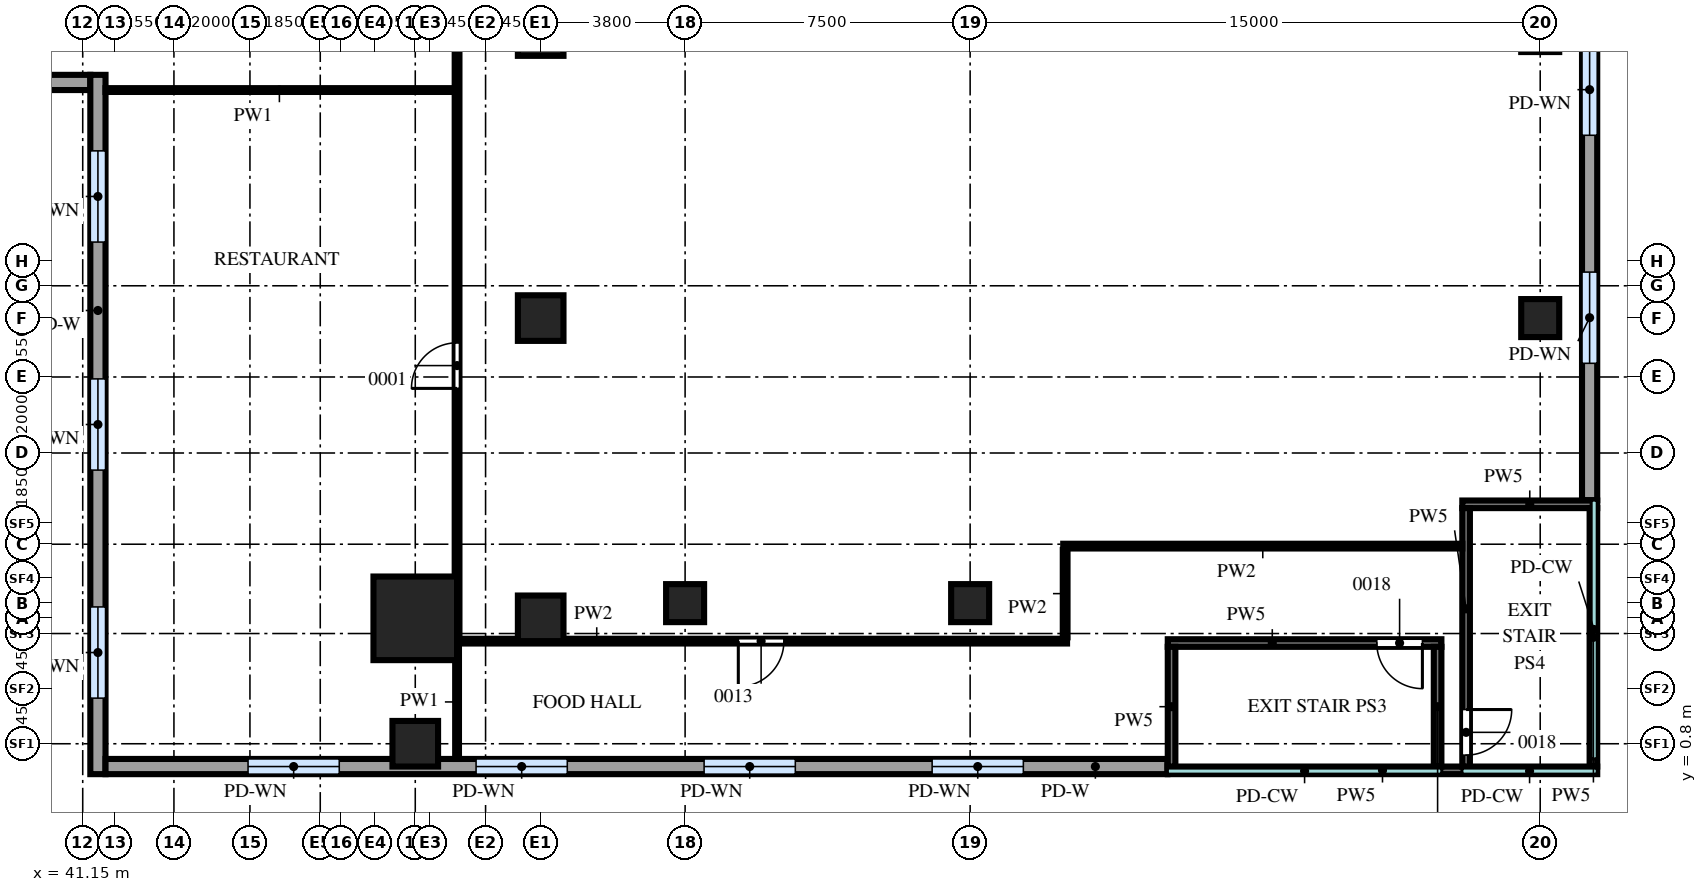
"""IFC4 building model, lengths in metres.
Left out: names, types, materials, properties, quantities, classifications, styles, units other than length and angle.
Written with IfcOpenShell. Run it as: python <this file> out.ifc"""

import sys

from ifc_helpers import new_model, si_unit, direction, frame, frame_2d, origin, origin_2d, place, context, subcontext, project, spatial, rectangle, extrude, source, transform, mapped, element, fill, save


model = new_model("IFC4")
c1 = context("Model", 3, precision=1e-05, world=origin(), true_north=direction((0.0, 1.0)))
c2 = subcontext(c1, "Body", "Model", "MODEL_VIEW")
j1 = project(units=[si_unit("LENGTHUNIT", "METRE"), si_unit("PLANEANGLEUNIT", "RADIAN")], contexts=[c1])
p1 = place(None, origin())
s1 = spatial("IfcSite", under=j1, at=p1, CompositionType="ELEMENT")
p2 = place(p1, origin())
s2 = spatial("IfcBuilding", under=s1, at=p2, CompositionType="ELEMENT")
p3 = place(p2, frame((0.0, 0.0, 18.5)))
s3 = spatial("IfcBuildingStorey", under=s2, at=p3, CompositionType="ELEMENT", Elevation=18.5)
m1 = source(origin(), c2, "Body", "SweptSolid", [
    extrude(rectangle(XDim=2.2, YDim=2.2, at=origin_2d()), origin(), (0.0, 0.0, 1.0), 4.7),
])
p4 = place(p3, frame((49.9, 4.1, 0.0), z_axis=(0.0, 0.0, 1.0), x_axis=(1.0, 0.0, 0.0)))
e1 = element("IfcColumn", 1, at=p4, inside=s3, PredefinedType="COLUMN", context=c2, shape_type="MappedRepresentation", body=[
    mapped(m1, transform((0.0, 0.0, 0.0))),
])
m2 = source(origin(), c2, "Body", "SweptSolid", [
    extrude(rectangle(XDim=1.2, YDim=1.2, at=origin_2d()), origin(), (0.0, 0.0, 1.0), 4.7),
])
for number, where, z_axis, x_axis in (
    (2, (49.9, 0.8, 0.0), (0.0, 0.0, 1.0), (1.0, 0.0, 0.0)),
    (3, (53.2, 4.1, 0.0), (0.0, 0.0, 1.0), (1.0, 0.0, 0.0)),
    (4, (53.2, 12.0, 0.0), (0.0, 0.0, 1.0), (1.0, 0.0, 0.0)),
    (5, (53.2, 19.5, 0.0), (0.0, 0.0, 1.0), (1.0, 0.0, 0.0)),
):
    element("IfcColumn", number, at=place(p3, frame(where, z_axis=z_axis, x_axis=x_axis)), inside=s3, PredefinedType="COLUMN", context=c2, shape_type="MappedRepresentation", body=[
        mapped(m2, transform((0.0, 0.0, 0.0))),
    ])
m3 = source(origin(), c2, "Body", "SweptSolid", [
    extrude(rectangle(XDim=1.0, YDim=1.0, at=origin_2d()), origin(), (0.0, 0.0, 1.0), 4.7),
])
for number, where, z_axis, x_axis in (
    (6, (57.0, 4.5, 0.0), (0.0, 0.0, 1.0), (1.0, 0.0, 0.0)),
    (7, (64.5, 4.5, 0.0), (0.0, 0.0, 1.0), (1.0, 0.0, 0.0)),
    (8, (79.5, 12.0, 0.0), (0.0, 0.0, 1.0), (1.0, 0.0, 0.0)),
):
    element("IfcColumn", number, at=place(p3, frame(where, z_axis=z_axis, x_axis=x_axis)), inside=s3, PredefinedType="COLUMN", context=c2, shape_type="MappedRepresentation", body=[
        mapped(m3, transform((0.0, 0.0, 0.0))),
    ])
m4 = source(origin(), c2, "Body", "SweptSolid", [
    extrude(rectangle(XDim=11.1, YDim=0.4, at=frame_2d((5.55, 0.0))), origin(), (0.0, 0.0, 1.0), 4.7),
])
p5 = place(p3, frame((30.25, 18.2, 0.0), z_axis=(0.0, 0.0, 1.0), x_axis=(1.0, 0.0, 0.0)))
e9 = element("IfcWall", 9, at=p5, inside=s3, PredefinedType="SOLIDWALL", context=c2, shape_type="MappedRepresentation", body=[
    mapped(m4, transform((0.0, 0.0, 0.0))),
])
m5 = source(origin(), c2, "Body", "SweptSolid", [
    extrude(rectangle(XDim=2.4, YDim=2.4, at=frame_2d((1.2, 1.2))), frame((0.0, 0.21, 0.0), z_axis=(0.0, -1.0, 0.0), x_axis=(1.0, 0.0, 0.0)), (0.0, 0.0, 1.0), 0.42),
])
p6 = place(p5, frame((4.35, 0.0, 1.0)))
e10 = element("IfcOpeningElement", 10, at=p6, cuts=e9, PredefinedType="OPENING", context=c2, shape_type="MappedRepresentation", body=[
    mapped(m5, transform((0.0, 0.0, 0.0))),
])
m6 = source(origin(), c2, "Body", "SweptSolid", [
    extrude(rectangle(XDim=18.4, YDim=0.4, at=frame_2d((9.2, 0.0))), origin(), (0.0, 0.0, 1.0), 4.7),
])
p7 = place(p3, frame((41.55, 18.4, 0.0), z_axis=(0.0, 0.0, 1.0), x_axis=(0.0, -1.0, 0.0)))
e11 = element("IfcWall", 11, at=p7, inside=s3, PredefinedType="SOLIDWALL", context=c2, shape_type="MappedRepresentation", body=[
    mapped(m6, transform((0.0, 0.0, 0.0))),
])
p8 = place(p7, frame((2.0, 0.0, 1.0)))
e12 = element("IfcOpeningElement", 12, at=p8, cuts=e11, PredefinedType="OPENING", context=c2, shape_type="MappedRepresentation", body=[
    mapped(m5, transform((0.0, 0.0, 0.0))),
])
p9 = place(p7, frame((8.0, 0.0, 1.0)))
e13 = element("IfcOpeningElement", 13, at=p9, cuts=e11, PredefinedType="OPENING", context=c2, shape_type="MappedRepresentation", body=[
    mapped(m5, transform((0.0, 0.0, 0.0))),
])
p10 = place(p7, frame((14.0, 0.0, 1.0)))
e14 = element("IfcOpeningElement", 14, at=p10, cuts=e11, PredefinedType="OPENING", context=c2, shape_type="MappedRepresentation", body=[
    mapped(m5, transform((0.0, 0.0, 0.0))),
])
m7 = source(origin(), c2, "Body", "SweptSolid", [
    extrude(rectangle(XDim=27.94, YDim=0.4, at=frame_2d((13.97, 0.0))), origin(), (0.0, 0.0, 1.0), 4.7),
])
p11 = place(p3, frame((41.75, 0.2, 0.0), z_axis=(0.0, 0.0, 1.0), x_axis=(1.0, 0.0, 0.0)))
e15 = element("IfcWall", 15, at=p11, inside=s3, PredefinedType="SOLIDWALL", context=c2, shape_type="MappedRepresentation", body=[
    mapped(m7, transform((0.0, 0.0, 0.0))),
])
p12 = place(p11, frame((3.75, 0.0, 1.0)))
e16 = element("IfcOpeningElement", 16, at=p12, cuts=e15, PredefinedType="OPENING", context=c2, shape_type="MappedRepresentation", body=[
    mapped(m5, transform((0.0, 0.0, 0.0))),
])
p13 = place(p11, frame((9.75, 0.0, 1.0)))
e17 = element("IfcOpeningElement", 17, at=p13, cuts=e15, PredefinedType="OPENING", context=c2, shape_type="MappedRepresentation", body=[
    mapped(m5, transform((0.0, 0.0, 0.0))),
])
p14 = place(p11, frame((15.75, 0.0, 1.0)))
e18 = element("IfcOpeningElement", 18, at=p14, cuts=e15, PredefinedType="OPENING", context=c2, shape_type="MappedRepresentation", body=[
    mapped(m5, transform((0.0, 0.0, 0.0))),
])
p15 = place(p11, frame((21.75, 0.0, 1.0)))
e19 = element("IfcOpeningElement", 19, at=p15, cuts=e15, PredefinedType="OPENING", context=c2, shape_type="MappedRepresentation", body=[
    mapped(m5, transform((0.0, 0.0, 0.0))),
])
m8 = source(origin(), c2, "Body", "SweptSolid", [
    extrude(rectangle(XDim=39.58, YDim=0.4, at=frame_2d((19.79, 0.0))), origin(), (0.0, 0.0, 1.0), 4.7),
])
p16 = place(p3, frame((80.8, 7.21, 0.0), z_axis=(0.0, 0.0, 1.0), x_axis=(0.0, 1.0, 0.0)))
e20 = element("IfcWall", 20, at=p16, inside=s3, PredefinedType="SOLIDWALL", context=c2, shape_type="MappedRepresentation", body=[
    mapped(m8, transform((0.0, 0.0, 0.0))),
])
p17 = place(p16, frame((3.6, 0.0, 1.0)))
e21 = element("IfcOpeningElement", 21, at=p17, cuts=e20, PredefinedType="OPENING", context=c2, shape_type="MappedRepresentation", body=[
    mapped(m5, transform((0.0, 0.0, 0.0))),
])
p18 = place(p16, frame((9.6, 0.0, 1.0)))
e22 = element("IfcOpeningElement", 22, at=p18, cuts=e20, PredefinedType="OPENING", context=c2, shape_type="MappedRepresentation", body=[
    mapped(m5, transform((0.0, 0.0, 0.0))),
])
p19 = place(p16, frame((15.6, 0.0, 1.0)))
e23 = element("IfcOpeningElement", 23, at=p19, cuts=e20, PredefinedType="OPENING", context=c2, shape_type="MappedRepresentation", body=[
    mapped(m5, transform((0.0, 0.0, 0.0))),
])
p20 = place(p16, frame((21.6, 0.0, 1.0)))
e24 = element("IfcOpeningElement", 24, at=p20, cuts=e20, PredefinedType="OPENING", context=c2, shape_type="MappedRepresentation", body=[
    mapped(m5, transform((0.0, 0.0, 0.0))),
])
p21 = place(p16, frame((27.6, 0.0, 1.0)))
e25 = element("IfcOpeningElement", 25, at=p21, cuts=e20, PredefinedType="OPENING", context=c2, shape_type="MappedRepresentation", body=[
    mapped(m5, transform((0.0, 0.0, 0.0))),
])
p22 = place(p16, frame((33.6, 0.0, 1.0)))
e26 = element("IfcOpeningElement", 26, at=p22, cuts=e20, PredefinedType="OPENING", context=c2, shape_type="MappedRepresentation", body=[
    mapped(m5, transform((0.0, 0.0, 0.0))),
])
m9 = source(origin(), c2, "Body", "SweptSolid", [
    extrude(rectangle(XDim=11.3, YDim=0.2, at=frame_2d((5.65, 0.0))), origin(), (0.0, 0.0, 1.0), 4.7),
])
p23 = place(p3, frame((69.7, 0.1, 0.0), z_axis=(0.0, 0.0, 1.0), x_axis=(1.0, 0.0, 0.0)))
e27 = element("IfcWall", 27, at=p23, inside=s3, PredefinedType="PARTITIONING", context=c2, shape_type="MappedRepresentation", body=[
    mapped(m9, transform((0.0, 0.0, 0.0))),
])
m10 = source(origin(), c2, "Body", "SweptSolid", [
    extrude(rectangle(XDim=7.2, YDim=0.2, at=frame_2d((3.6, 0.0))), origin(), (0.0, 0.0, 1.0), 4.7),
])
p24 = place(p3, frame((69.7, 3.45, 0.0), z_axis=(0.0, 0.0, 1.0), x_axis=(1.0, 0.0, 0.0)))
e28 = element("IfcWall", 28, at=p24, inside=s3, PredefinedType="PARTITIONING", context=c2, shape_type="MappedRepresentation", body=[
    mapped(m10, transform((0.0, 0.0, 0.0))),
])
m11 = source(origin(), c2, "Body", "SweptSolid", [
    extrude(rectangle(XDim=1.2, YDim=2.1, at=frame_2d((0.6, 1.05))), frame((0.0, 0.11, 0.0), z_axis=(0.0, -1.0, 0.0), x_axis=(1.0, 0.0, 0.0)), (0.0, 0.0, 1.0), 0.22),
])
p25 = place(p24, frame((5.5, 0.0, 0.0)))
e29 = element("IfcOpeningElement", 29, at=p25, cuts=e28, PredefinedType="OPENING", context=c2, shape_type="MappedRepresentation", body=[
    mapped(m11, transform((0.0, 0.0, 0.0))),
])
m12 = source(origin(), c2, "Body", "SweptSolid", [
    extrude(rectangle(XDim=3.15, YDim=0.2, at=frame_2d((1.575, 0.0))), origin(), (0.0, 0.0, 1.0), 4.7),
])
for number, where, z_axis, x_axis in (
    (30, (69.8, 0.2, 0.0), (0.0, 0.0, 1.0), (0.0, 1.0, 0.0)),
    (31, (76.8, 0.2, 0.0), (0.0, 0.0, 1.0), (0.0, 1.0, 0.0)),
):
    element("IfcWall", number, at=place(p3, frame(where, z_axis=z_axis, x_axis=x_axis)), inside=s3, PredefinedType="PARTITIONING", context=c2, shape_type="MappedRepresentation", body=[
        mapped(m12, transform((0.0, 0.0, 0.0))),
    ])
m13 = source(origin(), c2, "Body", "SweptSolid", [
    extrude(rectangle(XDim=3.55, YDim=0.2, at=frame_2d((1.775, 0.0))), origin(), (0.0, 0.0, 1.0), 4.7),
])
p26 = place(p3, frame((77.45, 7.1, 0.0), z_axis=(0.0, 0.0, 1.0), x_axis=(1.0, 0.0, 0.0)))
e32 = element("IfcWall", 32, at=p26, inside=s3, PredefinedType="PARTITIONING", context=c2, shape_type="MappedRepresentation", body=[
    mapped(m13, transform((0.0, 0.0, 0.0))),
])
m14 = source(origin(), c2, "Body", "SweptSolid", [
    extrude(rectangle(XDim=6.8, YDim=0.2, at=frame_2d((3.4, 0.0))), origin(), (0.0, 0.0, 1.0), 4.7),
])
p27 = place(p3, frame((77.55, 0.2, 0.0), z_axis=(0.0, 0.0, 1.0), x_axis=(0.0, 1.0, 0.0)))
e33 = element("IfcWall", 33, at=p27, inside=s3, PredefinedType="PARTITIONING", context=c2, shape_type="MappedRepresentation", body=[
    mapped(m14, transform((0.0, 0.0, 0.0))),
])
p28 = place(p27, frame((0.3, 0.0, 0.0)))
e34 = element("IfcOpeningElement", 34, at=p28, cuts=e33, PredefinedType="OPENING", context=c2, shape_type="MappedRepresentation", body=[
    mapped(m11, transform((0.0, 0.0, 0.0))),
])
p29 = place(p3, frame((80.9, 0.2, 0.0), z_axis=(0.0, 0.0, 1.0), x_axis=(0.0, 1.0, 0.0)))
e35 = element("IfcWall", 35, at=p29, inside=s3, PredefinedType="PARTITIONING", context=c2, shape_type="MappedRepresentation", body=[
    mapped(m14, transform((0.0, 0.0, 0.0))),
])
m15 = source(origin(), c2, "Body", "SweptSolid", [
    extrude(rectangle(XDim=3.0, YDim=0.1, at=frame_2d((1.5, 0.0))), origin(), (0.0, 0.0, 1.0), 4.7),
])
p30 = place(p3, frame((51.0, 0.4, 0.0), z_axis=(0.0, 0.0, 1.0), x_axis=(0.0, 1.0, 0.0)))
e36 = element("IfcWall", 36, at=p30, inside=s3, PredefinedType="PARTITIONING", context=c2, shape_type="MappedRepresentation", body=[
    mapped(m15, transform((0.0, 0.0, 0.0))),
])
m16 = source(origin(), c2, "Body", "SweptSolid", [
    extrude(rectangle(XDim=16.1, YDim=0.125, at=frame_2d((8.05, 0.0))), origin(), (0.0, 0.0, 1.0), 4.7),
])
p31 = place(p3, frame((50.95, 3.5, 0.0), z_axis=(0.0, 0.0, 1.0), x_axis=(1.0, 0.0, 0.0)))
e37 = element("IfcWall", 37, at=p31, inside=s3, PredefinedType="PARTITIONING", context=c2, shape_type="MappedRepresentation", body=[
    mapped(m16, transform((0.0, 0.0, 0.0))),
])
m17 = source(origin(), c2, "Body", "SweptSolid", [
    extrude(rectangle(XDim=1.2, YDim=2.1, at=frame_2d((0.6, 1.05))), frame((0.0, 0.073, 0.0), z_axis=(0.0, -1.0, 0.0), x_axis=(1.0, 0.0, 0.0)), (0.0, 0.0, 1.0), 0.145),
])
p32 = place(p31, frame((7.45, 0.0, 0.0)))
e38 = element("IfcOpeningElement", 38, at=p32, cuts=e37, PredefinedType="OPENING", context=c2, shape_type="MappedRepresentation", body=[
    mapped(m17, transform((0.0, 0.0, 0.0))),
])
m18 = source(origin(), c2, "Body", "SweptSolid", [
    extrude(rectangle(XDim=29.7, YDim=0.125, at=frame_2d((14.85, 0.0))), origin(), (0.0, 0.0, 1.0), 4.7),
])
p33 = place(p3, frame((51.0, 3.6, 0.0), z_axis=(0.0, 0.0, 1.0), x_axis=(0.0, 1.0, 0.0)))
e39 = element("IfcWall", 39, at=p33, inside=s3, PredefinedType="PARTITIONING", context=c2, shape_type="MappedRepresentation", body=[
    mapped(m18, transform((0.0, 0.0, 0.0))),
])
p34 = place(p33, frame((6.55, 0.0, 0.0)))
e40 = element("IfcOpeningElement", 40, at=p34, cuts=e39, PredefinedType="OPENING", context=c2, shape_type="MappedRepresentation", body=[
    mapped(m17, transform((0.0, 0.0, 0.0))),
])
m19 = source(origin(), c2, "Body", "SweptSolid", [
    extrude(rectangle(XDim=2.3, YDim=0.125, at=frame_2d((1.15, 0.0))), origin(), (0.0, 0.0, 1.0), 4.7),
])
p35 = place(p3, frame((67.0, 3.6, 0.0), z_axis=(0.0, 0.0, 1.0), x_axis=(0.0, 1.0, 0.0)))
e41 = element("IfcWall", 41, at=p35, inside=s3, PredefinedType="PARTITIONING", context=c2, shape_type="MappedRepresentation", body=[
    mapped(m19, transform((0.0, 0.0, 0.0))),
])
m20 = source(origin(), c2, "Body", "SweptSolid", [
    extrude(rectangle(XDim=10.5, YDim=0.125, at=frame_2d((5.25, 0.0))), origin(), (0.0, 0.0, 1.0), 4.7),
])
p36 = place(p3, frame((66.95, 6.0, 0.0), z_axis=(0.0, 0.0, 1.0), x_axis=(1.0, 0.0, 0.0)))
e42 = element("IfcWall", 42, at=p36, inside=s3, PredefinedType="PARTITIONING", context=c2, shape_type="MappedRepresentation", body=[
    mapped(m20, transform((0.0, 0.0, 0.0))),
])
m21 = source(origin(), c2, "Body", "SweptSolid", [
    extrude(rectangle(XDim=9.15, YDim=0.1, at=frame_2d((4.575, 0.0))), origin(), (0.0, 0.0, 1.0), 4.7),
])
p37 = place(p3, frame((41.75, 18.0, 0.0), z_axis=(0.0, 0.0, 1.0), x_axis=(1.0, 0.0, 0.0)))
e43 = element("IfcWall", 43, at=p37, inside=s3, PredefinedType="PARTITIONING", context=c2, shape_type="MappedRepresentation", body=[
    mapped(m21, transform((0.0, 0.0, 0.0))),
])
m22 = source(origin(), c2, "Body", "SweptSolid", [
    extrude(rectangle(XDim=2.4, YDim=2.4, at=frame_2d((1.2, 1.2))), frame((0.0, 0.03, 0.0), z_axis=(0.0, -1.0, 0.0), x_axis=(1.0, 0.0, 0.0)), (0.0, 0.0, 1.0), 0.06),
])
p38 = place(p8, origin())
e44 = element("IfcWindow", 44, at=p38, inside=s3, PartitioningType="SINGLE_PANEL", PredefinedType="WINDOW", context=c2, shape_type="MappedRepresentation", body=[
    mapped(m22, transform((0.0, 0.0, 0.0))),
])
fill(e12, e44)
p39 = place(p9, origin())
e45 = element("IfcWindow", 45, at=p39, inside=s3, PartitioningType="SINGLE_PANEL", PredefinedType="WINDOW", context=c2, shape_type="MappedRepresentation", body=[
    mapped(m22, transform((0.0, 0.0, 0.0))),
])
fill(e13, e45)
p40 = place(p10, origin())
e46 = element("IfcWindow", 46, at=p40, inside=s3, PartitioningType="SINGLE_PANEL", PredefinedType="WINDOW", context=c2, shape_type="MappedRepresentation", body=[
    mapped(m22, transform((0.0, 0.0, 0.0))),
])
fill(e14, e46)
p41 = place(p12, origin())
e47 = element("IfcWindow", 47, at=p41, inside=s3, PartitioningType="SINGLE_PANEL", PredefinedType="WINDOW", context=c2, shape_type="MappedRepresentation", body=[
    mapped(m22, transform((0.0, 0.0, 0.0))),
])
fill(e16, e47)
p42 = place(p13, origin())
e48 = element("IfcWindow", 48, at=p42, inside=s3, PartitioningType="SINGLE_PANEL", PredefinedType="WINDOW", context=c2, shape_type="MappedRepresentation", body=[
    mapped(m22, transform((0.0, 0.0, 0.0))),
])
fill(e17, e48)
p43 = place(p14, origin())
e49 = element("IfcWindow", 49, at=p43, inside=s3, PartitioningType="SINGLE_PANEL", PredefinedType="WINDOW", context=c2, shape_type="MappedRepresentation", body=[
    mapped(m22, transform((0.0, 0.0, 0.0))),
])
fill(e18, e49)
p44 = place(p15, origin())
e50 = element("IfcWindow", 50, at=p44, inside=s3, PartitioningType="SINGLE_PANEL", PredefinedType="WINDOW", context=c2, shape_type="MappedRepresentation", body=[
    mapped(m22, transform((0.0, 0.0, 0.0))),
])
fill(e19, e50)
p45 = place(p17, origin())
e51 = element("IfcWindow", 51, at=p45, inside=s3, PartitioningType="SINGLE_PANEL", PredefinedType="WINDOW", context=c2, shape_type="MappedRepresentation", body=[
    mapped(m22, transform((0.0, 0.0, 0.0))),
])
fill(e21, e51)
p46 = place(p18, origin())
e52 = element("IfcWindow", 52, at=p46, inside=s3, PartitioningType="SINGLE_PANEL", PredefinedType="WINDOW", context=c2, shape_type="MappedRepresentation", body=[
    mapped(m22, transform((0.0, 0.0, 0.0))),
])
fill(e22, e52)
m23 = source(origin(), c2, "Body", "SweptSolid", [
    extrude(rectangle(XDim=1.2, YDim=2.1, at=frame_2d((0.6, 1.05))), frame((0.0, 0.025, 0.0), z_axis=(0.0, -1.0, 0.0), x_axis=(1.0, 0.0, 0.0)), (0.0, 0.0, 1.0), 0.05),
])
p47 = place(p34, origin())
e53 = element("IfcDoor", 53, at=p47, inside=s3, OperationType="SINGLE_SWING_RIGHT", PredefinedType="DOOR", context=c2, shape_type="MappedRepresentation", body=[
    mapped(m23, transform((0.0, 0.0, 0.0))),
])
fill(e40, e53)
p48 = place(p32, origin())
e54 = element("IfcDoor", 54, at=p48, inside=s3, OperationType="SINGLE_SWING_LEFT", PredefinedType="DOOR", context=c2, shape_type="MappedRepresentation", body=[
    mapped(m23, transform((0.0, 0.0, 0.0))),
])
fill(e38, e54)
p49 = place(p25, origin())
e55 = element("IfcDoor", 55, at=p49, inside=s3, OperationType="SINGLE_SWING_RIGHT", PredefinedType="DOOR", context=c2, shape_type="MappedRepresentation", body=[
    mapped(m23, transform((0.0, 0.0, 0.0))),
])
fill(e29, e55)
p50 = place(p28, origin())
e56 = element("IfcDoor", 56, at=p50, inside=s3, OperationType="SINGLE_SWING_RIGHT", PredefinedType="DOOR", context=c2, shape_type="MappedRepresentation", body=[
    mapped(m23, transform((0.0, 0.0, 0.0))),
])
fill(e34, e56)
save(model, sys.argv[1])
